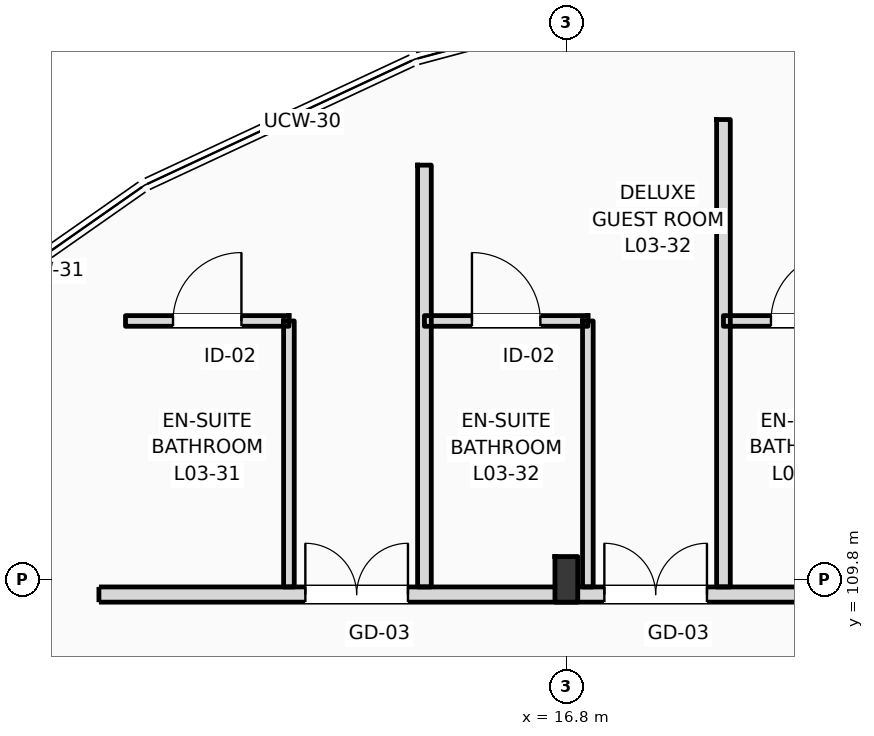
"""IFC4 building model, lengths in metres.
Left out: names, types, materials, properties, quantities, classifications, styles, units other than length and angle.
Written with IfcOpenShell. Run it as: python <this file> out.ifc"""

import sys

from ifc_helpers import new_model, si_unit, direction, frame, frame_2d, origin, origin_2d, place, context, subcontext, project, spatial, rectangle, i_section, extrude, element, fill, save


model = new_model("IFC4")
c1 = context("Model", 3, precision=1e-05, world=origin(), true_north=direction((0.0, 1.0)))
c2 = subcontext(c1, "Body", "Model", "MODEL_VIEW")
j1 = project(units=[si_unit("LENGTHUNIT", "METRE"), si_unit("PLANEANGLEUNIT", "RADIAN")], contexts=[c1])
p1 = place(None, origin())
s1 = spatial("IfcSite", under=j1, at=p1, CompositionType="ELEMENT")
p2 = place(p1, origin())
s2 = spatial("IfcBuilding", under=s1, at=p2, CompositionType="ELEMENT")
p3 = place(p2, frame((0.0, 0.0, 16.2)))
s3 = spatial("IfcBuildingStorey", under=s2, at=p3, CompositionType="ELEMENT", Elevation=16.2)
p4 = place(p3, frame((16.8, 109.8, 0.0), z_axis=(0.0, 0.0, 1.0), x_axis=(1.0, 0.0, 0.0)))
e1 = element("IfcColumn", 1, at=p4, inside=s3, PredefinedType="COLUMN", context=c2, shape_type="SweptSolid", body=[
    extrude(i_section(OverallWidth=0.3, OverallDepth=0.6, WebThickness=0.015, FlangeThickness=0.03, FilletRadius=0.027, at=origin_2d()), origin(), (0.0, 0.0, 1.0), 4.2),
])
p5 = place(p3, frame((10.65, 109.6, 0.0), z_axis=(0.0, 0.0, 1.0), x_axis=(1.0, 0.0, 0.0)))
e2 = element("IfcWall", 2, at=p5, inside=s3, PredefinedType="PARTITIONING", context=c2, shape_type="SweptSolid", body=[
    extrude(rectangle(XDim=109.21, YDim=0.2, at=frame_2d((54.605, 0.0))), origin(), (0.0, 0.0, 1.0), 3.36),
])
p6 = place(p5, frame((15.43, 0.0, 0.0)))
e3 = element("IfcOpeningElement", 3, at=p6, cuts=e2, PredefinedType="OPENING", context=c2, shape_type="SweptSolid", body=[
    extrude(rectangle(XDim=1.02, YDim=2.2, at=frame_2d((0.51, 1.1))), frame((0.0, 0.11, 0.0), z_axis=(0.0, -1.0, 0.0), x_axis=(1.0, 0.0, 0.0)), (0.0, 0.0, 1.0), 0.22),
])
p7 = place(p5, frame((19.537, 0.0, 0.0)))
e4 = element("IfcOpeningElement", 4, at=p7, cuts=e2, PredefinedType="OPENING", context=c2, shape_type="SweptSolid", body=[
    extrude(rectangle(XDim=1.02, YDim=2.2, at=frame_2d((0.51, 1.1))), frame((0.0, 0.11, 0.0), z_axis=(0.0, -1.0, 0.0), x_axis=(1.0, 0.0, 0.0)), (0.0, 0.0, 1.0), 0.22),
])
p8 = place(p5, frame((23.928, 0.0, 0.0)))
e5 = element("IfcOpeningElement", 5, at=p8, cuts=e2, PredefinedType="OPENING", context=c2, shape_type="SweptSolid", body=[
    extrude(rectangle(XDim=1.02, YDim=2.2, at=frame_2d((0.51, 1.1))), frame((0.0, 0.11, 0.0), z_axis=(0.0, -1.0, 0.0), x_axis=(1.0, 0.0, 0.0)), (0.0, 0.0, 1.0), 0.22),
])
p9 = place(p5, frame((26.169, 0.0, 0.0)))
e6 = element("IfcOpeningElement", 6, at=p9, cuts=e2, PredefinedType="OPENING", context=c2, shape_type="SweptSolid", body=[
    extrude(rectangle(XDim=1.02, YDim=2.2, at=frame_2d((0.51, 1.1))), frame((0.0, 0.11, 0.0), z_axis=(0.0, -1.0, 0.0), x_axis=(1.0, 0.0, 0.0)), (0.0, 0.0, 1.0), 0.22),
])
p10 = place(p5, frame((32.739, 0.0, 0.0)))
e7 = element("IfcOpeningElement", 7, at=p10, cuts=e2, PredefinedType="OPENING", context=c2, shape_type="SweptSolid", body=[
    extrude(rectangle(XDim=0.96, YDim=2.2, at=frame_2d((0.48, 1.1))), frame((0.0, 0.11, 0.0), z_axis=(0.0, -1.0, 0.0), x_axis=(1.0, 0.0, 0.0)), (0.0, 0.0, 1.0), 0.22),
])
p11 = place(p5, frame((34.98, 0.0, 0.0)))
e8 = element("IfcOpeningElement", 8, at=p11, cuts=e2, PredefinedType="OPENING", context=c2, shape_type="SweptSolid", body=[
    extrude(rectangle(XDim=0.96, YDim=2.2, at=frame_2d((0.48, 1.1))), frame((0.0, 0.11, 0.0), z_axis=(0.0, -1.0, 0.0), x_axis=(1.0, 0.0, 0.0)), (0.0, 0.0, 1.0), 0.22),
])
p12 = place(p5, frame((41.521, 0.0, 0.0)))
e9 = element("IfcOpeningElement", 9, at=p12, cuts=e2, PredefinedType="OPENING", context=c2, shape_type="SweptSolid", body=[
    extrude(rectangle(XDim=0.96, YDim=2.2, at=frame_2d((0.48, 1.1))), frame((0.0, 0.11, 0.0), z_axis=(0.0, -1.0, 0.0), x_axis=(1.0, 0.0, 0.0)), (0.0, 0.0, 1.0), 0.22),
])
p13 = place(p5, frame((43.512, 0.0, 0.0)))
e10 = element("IfcOpeningElement", 10, at=p13, cuts=e2, PredefinedType="OPENING", context=c2, shape_type="SweptSolid", body=[
    extrude(rectangle(XDim=0.96, YDim=2.2, at=frame_2d((0.48, 1.1))), frame((0.0, 0.11, 0.0), z_axis=(0.0, -1.0, 0.0), x_axis=(1.0, 0.0, 0.0)), (0.0, 0.0, 1.0), 0.22),
])
p14 = place(p5, frame((50.303, 0.0, 0.0)))
e11 = element("IfcOpeningElement", 11, at=p14, cuts=e2, PredefinedType="OPENING", context=c2, shape_type="SweptSolid", body=[
    extrude(rectangle(XDim=0.96, YDim=2.2, at=frame_2d((0.48, 1.1))), frame((0.0, 0.11, 0.0), z_axis=(0.0, -1.0, 0.0), x_axis=(1.0, 0.0, 0.0)), (0.0, 0.0, 1.0), 0.22),
])
p15 = place(p5, frame((54.944, 0.0, 0.0)))
e12 = element("IfcOpeningElement", 12, at=p15, cuts=e2, PredefinedType="OPENING", context=c2, shape_type="SweptSolid", body=[
    extrude(rectangle(XDim=0.96, YDim=2.2, at=frame_2d((0.48, 1.1))), frame((0.0, 0.11, 0.0), z_axis=(0.0, -1.0, 0.0), x_axis=(1.0, 0.0, 0.0)), (0.0, 0.0, 1.0), 0.22),
])
p16 = place(p5, frame((59.085, 0.0, 0.0)))
e13 = element("IfcOpeningElement", 13, at=p16, cuts=e2, PredefinedType="OPENING", context=c2, shape_type="SweptSolid", body=[
    extrude(rectangle(XDim=0.96, YDim=2.2, at=frame_2d((0.48, 1.1))), frame((0.0, 0.11, 0.0), z_axis=(0.0, -1.0, 0.0), x_axis=(1.0, 0.0, 0.0)), (0.0, 0.0, 1.0), 0.22),
])
p17 = place(p5, frame((63.476, 0.0, 0.0)))
e14 = element("IfcOpeningElement", 14, at=p17, cuts=e2, PredefinedType="OPENING", context=c2, shape_type="SweptSolid", body=[
    extrude(rectangle(XDim=0.96, YDim=2.2, at=frame_2d((0.48, 1.1))), frame((0.0, 0.11, 0.0), z_axis=(0.0, -1.0, 0.0), x_axis=(1.0, 0.0, 0.0)), (0.0, 0.0, 1.0), 0.22),
])
p18 = place(p5, frame((65.716, 0.0, 0.0)))
e15 = element("IfcOpeningElement", 15, at=p18, cuts=e2, PredefinedType="OPENING", context=c2, shape_type="SweptSolid", body=[
    extrude(rectangle(XDim=0.96, YDim=2.2, at=frame_2d((0.48, 1.1))), frame((0.0, 0.11, 0.0), z_axis=(0.0, -1.0, 0.0), x_axis=(1.0, 0.0, 0.0)), (0.0, 0.0, 1.0), 0.22),
])
p19 = place(p5, frame((72.257, 0.0, 0.0)))
e16 = element("IfcOpeningElement", 16, at=p19, cuts=e2, PredefinedType="OPENING", context=c2, shape_type="SweptSolid", body=[
    extrude(rectangle(XDim=0.96, YDim=2.2, at=frame_2d((0.48, 1.1))), frame((0.0, 0.11, 0.0), z_axis=(0.0, -1.0, 0.0), x_axis=(1.0, 0.0, 0.0)), (0.0, 0.0, 1.0), 0.22),
])
p20 = place(p5, frame((74.498, 0.0, 0.0)))
e17 = element("IfcOpeningElement", 17, at=p20, cuts=e2, PredefinedType="OPENING", context=c2, shape_type="SweptSolid", body=[
    extrude(rectangle(XDim=0.96, YDim=2.2, at=frame_2d((0.48, 1.1))), frame((0.0, 0.11, 0.0), z_axis=(0.0, -1.0, 0.0), x_axis=(1.0, 0.0, 0.0)), (0.0, 0.0, 1.0), 0.22),
])
p21 = place(p5, frame((81.039, 0.0, 0.0)))
e18 = element("IfcOpeningElement", 18, at=p21, cuts=e2, PredefinedType="OPENING", context=c2, shape_type="SweptSolid", body=[
    extrude(rectangle(XDim=0.96, YDim=2.2, at=frame_2d((0.48, 1.1))), frame((0.0, 0.11, 0.0), z_axis=(0.0, -1.0, 0.0), x_axis=(1.0, 0.0, 0.0)), (0.0, 0.0, 1.0), 0.22),
])
p22 = place(p5, frame((85.68, 0.0, 0.0)))
e19 = element("IfcOpeningElement", 19, at=p22, cuts=e2, PredefinedType="OPENING", context=c2, shape_type="SweptSolid", body=[
    extrude(rectangle(XDim=0.96, YDim=2.2, at=frame_2d((0.48, 1.1))), frame((0.0, 0.11, 0.0), z_axis=(0.0, -1.0, 0.0), x_axis=(1.0, 0.0, 0.0)), (0.0, 0.0, 1.0), 0.22),
])
p23 = place(p5, frame((89.82, 0.0, 0.0)))
e20 = element("IfcOpeningElement", 20, at=p23, cuts=e2, PredefinedType="OPENING", context=c2, shape_type="SweptSolid", body=[
    extrude(rectangle(XDim=0.96, YDim=2.2, at=frame_2d((0.48, 1.1))), frame((0.0, 0.11, 0.0), z_axis=(0.0, -1.0, 0.0), x_axis=(1.0, 0.0, 0.0)), (0.0, 0.0, 1.0), 0.22),
])
p24 = place(p5, frame((94.211, 0.0, 0.0)))
e21 = element("IfcOpeningElement", 21, at=p24, cuts=e2, PredefinedType="OPENING", context=c2, shape_type="SweptSolid", body=[
    extrude(rectangle(XDim=0.96, YDim=2.2, at=frame_2d((0.48, 1.1))), frame((0.0, 0.11, 0.0), z_axis=(0.0, -1.0, 0.0), x_axis=(1.0, 0.0, 0.0)), (0.0, 0.0, 1.0), 0.22),
])
p25 = place(p5, frame((98.602, 0.0, 0.0)))
e22 = element("IfcOpeningElement", 22, at=p25, cuts=e2, PredefinedType="OPENING", context=c2, shape_type="SweptSolid", body=[
    extrude(rectangle(XDim=0.96, YDim=2.2, at=frame_2d((0.48, 1.1))), frame((0.0, 0.11, 0.0), z_axis=(0.0, -1.0, 0.0), x_axis=(1.0, 0.0, 0.0)), (0.0, 0.0, 1.0), 0.22),
])
p26 = place(p5, frame((102.993, 0.0, 0.0)))
e23 = element("IfcOpeningElement", 23, at=p26, cuts=e2, PredefinedType="OPENING", context=c2, shape_type="SweptSolid", body=[
    extrude(rectangle(XDim=0.96, YDim=2.2, at=frame_2d((0.48, 1.1))), frame((0.0, 0.11, 0.0), z_axis=(0.0, -1.0, 0.0), x_axis=(1.0, 0.0, 0.0)), (0.0, 0.0, 1.0), 0.22),
])
p27 = place(p5, frame((105.269, 0.0, 0.0)))
e24 = element("IfcOpeningElement", 24, at=p27, cuts=e2, PredefinedType="OPENING", context=c2, shape_type="SweptSolid", body=[
    extrude(rectangle(XDim=0.96, YDim=2.2, at=frame_2d((0.48, 1.1))), frame((0.0, 0.11, 0.0), z_axis=(0.0, -1.0, 0.0), x_axis=(1.0, 0.0, 0.0)), (0.0, 0.0, 1.0), 0.22),
])
p28 = place(p5, frame((2.716, 0.0, 0.0)))
e25 = element("IfcOpeningElement", 25, at=p28, cuts=e2, PredefinedType="OPENING", context=c2, shape_type="SweptSolid", body=[
    extrude(rectangle(XDim=1.35, YDim=2.25, at=frame_2d((0.675, 1.125))), frame((0.0, 0.11, 0.0), z_axis=(0.0, -1.0, 0.0), x_axis=(1.0, 0.0, 0.0)), (0.0, 0.0, 1.0), 0.22),
])
p29 = place(p5, frame((6.65, 0.0, 0.0)))
e26 = element("IfcOpeningElement", 26, at=p29, cuts=e2, PredefinedType="OPENING", context=c2, shape_type="SweptSolid", body=[
    extrude(rectangle(XDim=1.35, YDim=2.25, at=frame_2d((0.675, 1.125))), frame((0.0, 0.11, 0.0), z_axis=(0.0, -1.0, 0.0), x_axis=(1.0, 0.0, 0.0)), (0.0, 0.0, 1.0), 0.22),
])
p30 = place(p5, frame((10.583, 0.0, 0.0)))
e27 = element("IfcOpeningElement", 27, at=p30, cuts=e2, PredefinedType="OPENING", context=c2, shape_type="SweptSolid", body=[
    extrude(rectangle(XDim=1.35, YDim=2.25, at=frame_2d((0.675, 1.125))), frame((0.0, 0.11, 0.0), z_axis=(0.0, -1.0, 0.0), x_axis=(1.0, 0.0, 0.0)), (0.0, 0.0, 1.0), 0.22),
])
p31 = place(p3, frame((14.933, 109.7, 0.0), z_axis=(0.0, 0.0, 1.0), x_axis=(0.0, 1.0, 0.0)))
e28 = element("IfcWall", 28, at=p31, inside=s3, PredefinedType="PARTITIONING", context=c2, shape_type="SweptSolid", body=[
    extrude(rectangle(XDim=5.55, YDim=0.18, at=frame_2d((2.775, 0.0))), origin(), (0.0, 0.0, 1.0), 3.92),
])
p32 = place(p3, frame((13.15, 109.7, 0.0), z_axis=(0.0, 0.0, 1.0), x_axis=(0.0, 1.0, 0.0)))
e29 = element("IfcWall", 29, at=p32, inside=s3, PredefinedType="PARTITIONING", context=c2, shape_type="SweptSolid", body=[
    extrude(rectangle(XDim=3.5, YDim=0.14, at=frame_2d((1.75, 0.0))), origin(), (0.0, 0.0, 1.0), 3.92),
])
p33 = place(p3, frame((11.0, 113.2, 0.0), z_axis=(0.0, 0.0, 1.0), x_axis=(1.0, 0.0, 0.0)))
e30 = element("IfcWall", 30, at=p33, inside=s3, PredefinedType="PARTITIONING", context=c2, shape_type="SweptSolid", body=[
    extrude(rectangle(XDim=2.15, YDim=0.14, at=frame_2d((1.075, 0.0))), origin(), (0.0, 0.0, 1.0), 3.92),
])
p34 = place(p33, frame((0.625, 0.0, 0.0)))
e31 = element("IfcOpeningElement", 31, at=p34, cuts=e30, PredefinedType="OPENING", context=c2, shape_type="SweptSolid", body=[
    extrude(rectangle(XDim=0.9, YDim=2.1, at=frame_2d((0.45, 1.05))), frame((0.0, 0.08, 0.0), z_axis=(0.0, -1.0, 0.0), x_axis=(1.0, 0.0, 0.0)), (0.0, 0.0, 1.0), 0.16),
])
p35 = place(p3, frame((18.867, 109.7, 0.0), z_axis=(0.0, 0.0, 1.0), x_axis=(0.0, 1.0, 0.0)))
e32 = element("IfcWall", 32, at=p35, inside=s3, PredefinedType="PARTITIONING", context=c2, shape_type="SweptSolid", body=[
    extrude(rectangle(XDim=6.15, YDim=0.18, at=frame_2d((3.075, 0.0))), origin(), (0.0, 0.0, 1.0), 3.92),
])
p36 = place(p3, frame((17.083, 109.7, 0.0), z_axis=(0.0, 0.0, 1.0), x_axis=(0.0, 1.0, 0.0)))
e33 = element("IfcWall", 33, at=p36, inside=s3, PredefinedType="PARTITIONING", context=c2, shape_type="SweptSolid", body=[
    extrude(rectangle(XDim=3.5, YDim=0.14, at=frame_2d((1.75, 0.0))), origin(), (0.0, 0.0, 1.0), 3.92),
])
p37 = place(p3, frame((14.933, 113.2, 0.0), z_axis=(0.0, 0.0, 1.0), x_axis=(1.0, 0.0, 0.0)))
e34 = element("IfcWall", 34, at=p37, inside=s3, PredefinedType="PARTITIONING", context=c2, shape_type="SweptSolid", body=[
    extrude(rectangle(XDim=2.15, YDim=0.14, at=frame_2d((1.075, 0.0))), origin(), (0.0, 0.0, 1.0), 3.92),
])
p38 = place(p37, frame((0.625, 0.0, 0.0)))
e35 = element("IfcOpeningElement", 35, at=p38, cuts=e34, PredefinedType="OPENING", context=c2, shape_type="SweptSolid", body=[
    extrude(rectangle(XDim=0.9, YDim=2.1, at=frame_2d((0.45, 1.05))), frame((0.0, 0.08, 0.0), z_axis=(0.0, -1.0, 0.0), x_axis=(1.0, 0.0, 0.0)), (0.0, 0.0, 1.0), 0.16),
])
p39 = place(p3, frame((18.867, 113.2, 0.0), z_axis=(0.0, 0.0, 1.0), x_axis=(1.0, 0.0, 0.0)))
e36 = element("IfcWall", 36, at=p39, inside=s3, PredefinedType="PARTITIONING", context=c2, shape_type="SweptSolid", body=[
    extrude(rectangle(XDim=2.15, YDim=0.14, at=frame_2d((1.075, 0.0))), origin(), (0.0, 0.0, 1.0), 3.92),
])
p40 = place(p39, frame((0.625, 0.0, 0.0)))
e37 = element("IfcOpeningElement", 37, at=p40, cuts=e36, PredefinedType="OPENING", context=c2, shape_type="SweptSolid", body=[
    extrude(rectangle(XDim=0.9, YDim=2.1, at=frame_2d((0.45, 1.05))), frame((0.0, 0.08, 0.0), z_axis=(0.0, -1.0, 0.0), x_axis=(1.0, 0.0, 0.0)), (0.0, 0.0, 1.0), 0.16),
])
p41 = place(p28, origin())
e38 = element("IfcDoor", 38, at=p41, inside=s3, OperationType="DOUBLE_SWING_LEFT", PredefinedType="DOOR", context=c2, shape_type="SweptSolid", body=[
    extrude(rectangle(XDim=1.35, YDim=2.25, at=frame_2d((0.675, 1.125))), frame((0.0, 0.025, 0.0), z_axis=(0.0, -1.0, 0.0), x_axis=(1.0, 0.0, 0.0)), (0.0, 0.0, 1.0), 0.05),
])
fill(e25, e38)
p42 = place(p34, origin())
e39 = element("IfcDoor", 39, at=p42, inside=s3, OperationType="SINGLE_SWING_RIGHT", PredefinedType="DOOR", context=c2, shape_type="SweptSolid", body=[
    extrude(rectangle(XDim=0.9, YDim=2.1, at=frame_2d((0.45, 1.05))), frame((0.0, 0.025, 0.0), z_axis=(0.0, -1.0, 0.0), x_axis=(1.0, 0.0, 0.0)), (0.0, 0.0, 1.0), 0.05),
])
fill(e31, e39)
p43 = place(p29, origin())
e40 = element("IfcDoor", 40, at=p43, inside=s3, OperationType="DOUBLE_SWING_LEFT", PredefinedType="DOOR", context=c2, shape_type="SweptSolid", body=[
    extrude(rectangle(XDim=1.35, YDim=2.25, at=frame_2d((0.675, 1.125))), frame((0.0, 0.025, 0.0), z_axis=(0.0, -1.0, 0.0), x_axis=(1.0, 0.0, 0.0)), (0.0, 0.0, 1.0), 0.05),
])
fill(e26, e40)
p44 = place(p38, origin())
e41 = element("IfcDoor", 41, at=p44, inside=s3, OperationType="SINGLE_SWING_LEFT", PredefinedType="DOOR", context=c2, shape_type="SweptSolid", body=[
    extrude(rectangle(XDim=0.9, YDim=2.1, at=frame_2d((0.45, 1.05))), frame((0.0, 0.025, 0.0), z_axis=(0.0, -1.0, 0.0), x_axis=(1.0, 0.0, 0.0)), (0.0, 0.0, 1.0), 0.05),
])
fill(e35, e41)
p45 = place(p40, origin())
e42 = element("IfcDoor", 42, at=p45, inside=s3, OperationType="SINGLE_SWING_RIGHT", PredefinedType="DOOR", context=c2, shape_type="SweptSolid", body=[
    extrude(rectangle(XDim=0.9, YDim=2.1, at=frame_2d((0.45, 1.05))), frame((0.0, 0.025, 0.0), z_axis=(0.0, -1.0, 0.0), x_axis=(1.0, 0.0, 0.0)), (0.0, 0.0, 1.0), 0.05),
])
fill(e37, e42)
save(model, sys.argv[1])
